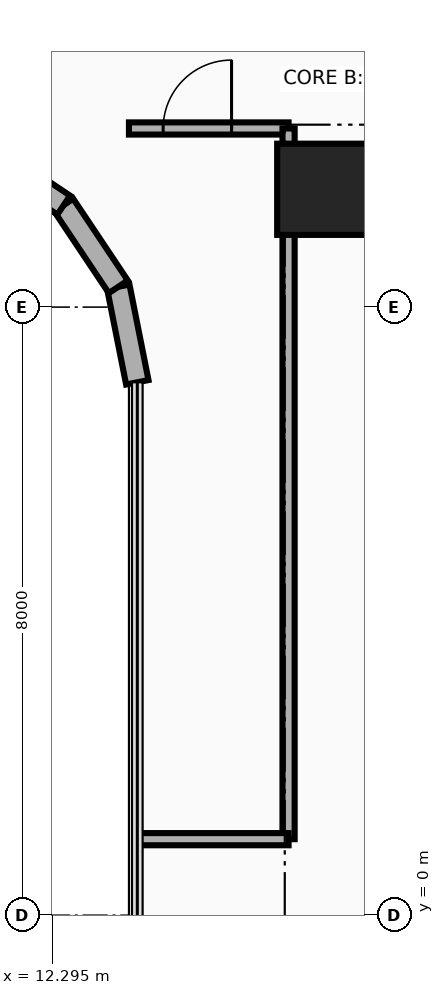
"""IFC4 building model, lengths in metres.
Left out: names, types, materials, properties, quantities, classifications, styles, units other than length and angle.
Written with IfcOpenShell. Run it as: python <this file> out.ifc"""

import sys

from ifc_helpers import new_model, si_unit, direction, frame, frame_2d, origin, origin_2d, place, context, subcontext, project, spatial, rectangle, extrude, source, transform, mapped, element, fill, save


model = new_model("IFC4")
c1 = context("Model", 3, precision=1e-05, world=origin(), true_north=direction((0.0, 1.0)))
c2 = subcontext(c1, "Body", "Model", "MODEL_VIEW")
j1 = project(units=[si_unit("LENGTHUNIT", "METRE"), si_unit("PLANEANGLEUNIT", "RADIAN")], contexts=[c1])
p1 = place(None, origin())
s1 = spatial("IfcSite", under=j1, at=p1, CompositionType="ELEMENT")
p2 = place(p1, origin())
s2 = spatial("IfcBuilding", under=s1, at=p2, CompositionType="ELEMENT")
p3 = place(p2, frame((0.0, 0.0, 139.0)))
s3 = spatial("IfcBuildingStorey", under=s2, at=p3, CompositionType="ELEMENT", Elevation=139.0)
p4 = place(p3, frame((15.85, 9.55, 0.0), z_axis=(0.0, 0.0, 1.0), x_axis=(1.0, 0.0, 0.0)))
e1 = element("IfcWall", 1, at=p4, inside=s3, PredefinedType="SHEAR", context=c2, shape_type="SweptSolid", body=[
    extrude(rectangle(XDim=9.0, YDim=0.7, at=frame_2d((4.5, 0.0))), origin(), (0.0, 0.0, 1.0), 3.46),
])
m1 = source(origin(), c2, "Body", "SweptSolid", [
    extrude(rectangle(XDim=1.2, YDim=1.2, at=origin_2d()), origin(), (0.0, 0.0, 1.0), 3.7),
])
p5 = place(p3, frame((15.85, 9.55, 0.0), z_axis=(0.0, 0.0, 1.0), x_axis=(1.0, 0.0, 0.0)))
e2 = element("IfcColumn", 2, at=p5, inside=s3, PredefinedType="COLUMN", context=c2, shape_type="MappedRepresentation", body=[
    mapped(m1, transform((0.0, 0.0, 0.0), x_axis=(1.0, 0.0, 0.0), y_axis=(0.0, 1.0, 0.0), z_axis=(0.0, 0.0, 1.0), scale=1.0)),
])
p6 = place(p3, frame((13.41, 7.011, 0.0), z_axis=(0.0, 0.0, 1.0), x_axis=(-0.195090163074, 0.980785312019, 0.0)))
e3 = element("IfcWall", 3, at=p6, inside=s3, PredefinedType="SOLIDWALL", context=c2, shape_type="SweptSolid", body=[
    extrude(rectangle(XDim=1.281, YDim=0.3, at=frame_2d((0.641, 0.0))), origin(), (0.0, 0.0, 1.0), 3.46),
])
for number, where, z_axis, x_axis in (
    (4, (13.16, 8.268, 0.0), (0.0, 0.0, 1.0), (-0.556, 0.831, 0.0)),
    (5, (12.442, 9.342, 0.0), (0.0, 0.0, 1.0), (-0.831, 0.556, 0.0)),
):
    element("IfcWall", number, at=place(p3, frame(where, z_axis=z_axis, x_axis=x_axis)), inside=s3, PredefinedType="SOLIDWALL", context=c2, shape_type="SweptSolid", body=[
        extrude(rectangle(XDim=1.292, YDim=0.3, at=frame_2d((0.646, 0.0))), origin(), (0.0, 0.0, 1.0), 3.46),
    ])
p7 = place(p3, frame((13.3, 10.35, 0.0), z_axis=(0.0, 0.0, 1.0), x_axis=(1.0, 0.0, 0.0)))
e6 = element("IfcWall", 6, at=p7, inside=s3, PredefinedType="PARTITIONING", context=c2, shape_type="SweptSolid", body=[
    extrude(rectangle(XDim=2.1, YDim=0.16, at=frame_2d((1.05, 0.0))), origin(), (0.0, 0.0, 1.0), 2.666),
])
p8 = place(p7, frame((0.45, 0.0, 0.0)))
e7 = element("IfcOpeningElement", 7, at=p8, cuts=e6, PredefinedType="OPENING", context=c2, shape_type="SweptSolid", body=[
    extrude(rectangle(XDim=0.9, YDim=2.1, at=frame_2d((0.45, 1.05))), frame((0.0, 0.095, 0.0), z_axis=(0.0, -1.0, 0.0), x_axis=(1.0, 0.0, 0.0)), (0.0, 0.0, 1.0), 0.19),
])
p9 = place(p3, frame((15.4, 1.0, 0.0), z_axis=(0.0, 0.0, 1.0), x_axis=(0.0, 1.0, 0.0)))
e8 = element("IfcWall", 8, at=p9, inside=s3, PredefinedType="PARTITIONING", context=c2, shape_type="SweptSolid", body=[
    extrude(rectangle(XDim=9.35, YDim=0.16, at=frame_2d((4.675, 0.0))), origin(), (0.0, 0.0, 1.0), 2.245),
])
p10 = place(p3, frame((13.41, 1.0, 0.0), z_axis=(0.0, 0.0, 1.0), x_axis=(1.0, 0.0, 0.0)))
e9 = element("IfcWall", 9, at=p10, inside=s3, PredefinedType="PARTITIONING", context=c2, shape_type="SweptSolid", body=[
    extrude(rectangle(XDim=1.99, YDim=0.16, at=frame_2d((0.995, 0.0))), origin(), (0.0, 0.0, 1.0), 2.245),
])
p11 = place(p8, origin())
e10 = element("IfcDoor", 10, at=p11, inside=s3, OperationType="SINGLE_SWING_RIGHT", PredefinedType="DOOR", context=c2, shape_type="SweptSolid", body=[
    extrude(rectangle(XDim=0.9, YDim=2.1, at=frame_2d((0.45, 1.05))), frame((0.0, 0.025, 0.0), z_axis=(0.0, -1.0, 0.0), x_axis=(1.0, 0.0, 0.0)), (0.0, 0.0, 1.0), 0.05),
])
fill(e7, e10)
save(model, sys.argv[1])
